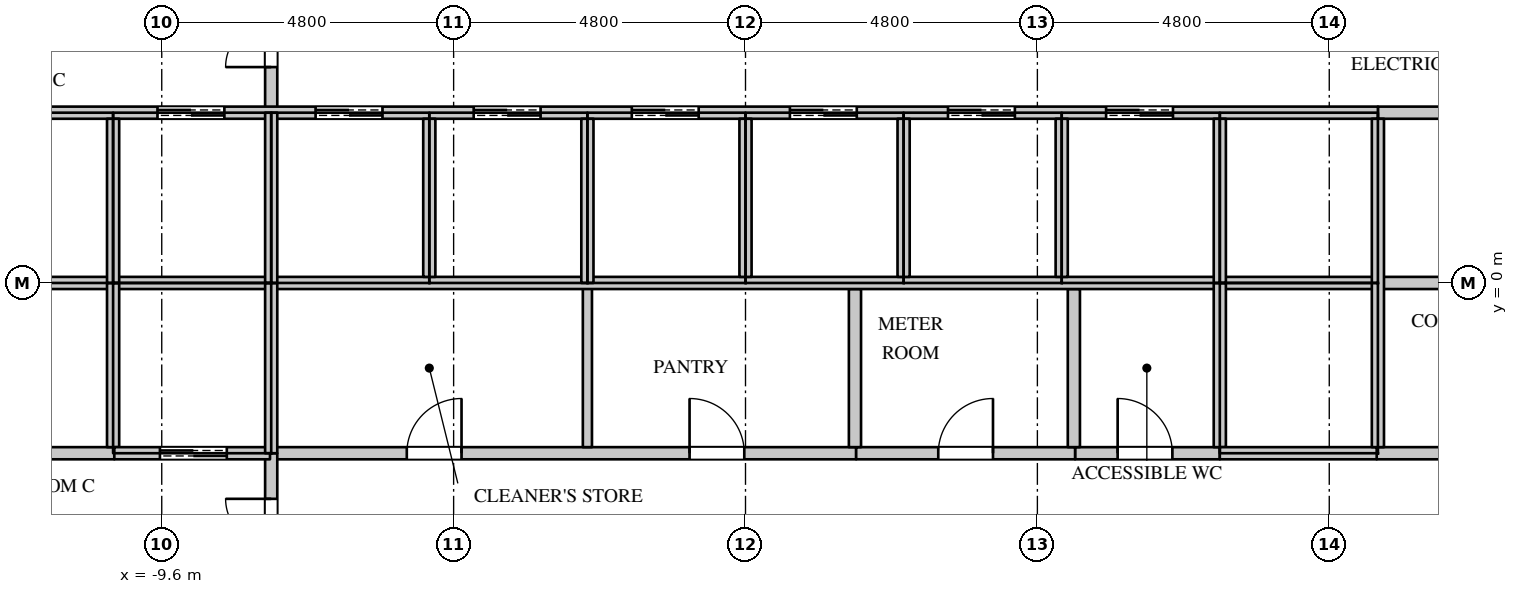
"""IFC4 building model, lengths in metres.
Left out: names, types, materials, properties, quantities, classifications, styles, units other than length and angle.
Written with IfcOpenShell. Run it as: python <this file> out.ifc"""

import sys

from ifc_helpers import new_model, si_unit, direction, frame, frame_2d, origin, place, context, subcontext, project, spatial, rectangle, extrude, element, fill, save


model = new_model("IFC4")
c1 = context("Model", 3, precision=1e-05, world=origin(), true_north=direction((0.0, 1.0)))
c2 = subcontext(c1, "Body", "Model", "MODEL_VIEW")
j1 = project(units=[si_unit("LENGTHUNIT", "METRE"), si_unit("PLANEANGLEUNIT", "RADIAN")], contexts=[c1])
p1 = place(None, origin())
s1 = spatial("IfcSite", under=j1, at=p1, CompositionType="ELEMENT")
p2 = place(p1, origin())
s2 = spatial("IfcBuilding", under=s1, at=p2, CompositionType="ELEMENT")
p3 = place(p2, frame((0.0, 0.0, 144.3)))
s3 = spatial("IfcBuildingStorey", under=s2, at=p3, CompositionType="ELEMENT", Elevation=144.3)
p4 = place(p3, frame((-7.82, -2.8, 0.0), z_axis=(0.0, 0.0, 1.0), x_axis=(1.0, 0.0, 0.0)))
e1 = element("IfcWall", 1, at=p4, inside=s3, PredefinedType="PARTITIONING", context=c2, shape_type="SweptSolid", body=[
    extrude(rectangle(XDim=9.64, YDim=0.2, at=frame_2d((4.82, 0.0))), origin(), (0.0, 0.0, 1.0), 3.798),
])
p5 = place(p4, frame((2.25, 0.0, 0.0)))
e2 = element("IfcOpeningElement", 2, at=p5, cuts=e1, PredefinedType="OPENING", context=c2, shape_type="SweptSolid", body=[
    extrude(rectangle(XDim=0.9, YDim=2.2, at=frame_2d((0.45, 1.1))), frame((0.0, 0.11, 0.0), z_axis=(0.0, -1.0, 0.0), x_axis=(1.0, 0.0, 0.0)), (0.0, 0.0, 1.0), 0.22),
])
p6 = place(p4, frame((6.9, 0.0, 0.0)))
e3 = element("IfcOpeningElement", 3, at=p6, cuts=e1, PredefinedType="OPENING", context=c2, shape_type="SweptSolid", body=[
    extrude(rectangle(XDim=0.9, YDim=2.2, at=frame_2d((0.45, 1.1))), frame((0.0, 0.11, 0.0), z_axis=(0.0, -1.0, 0.0), x_axis=(1.0, 0.0, 0.0)), (0.0, 0.0, 1.0), 0.22),
])
p7 = place(p3, frame((-7.8, -5.8, 0.0), z_axis=(0.0, 0.0, 1.0), x_axis=(0.0, 1.0, 0.0)))
e4 = element("IfcWall", 4, at=p7, inside=s3, PredefinedType="PARTITIONING", context=c2, shape_type="SweptSolid", body=[
    extrude(rectangle(XDim=3.0, YDim=0.2, at=frame_2d((1.5, 0.0))), origin(), (0.0, 0.0, 1.0), 3.798),
])
p8 = place(p7, frame((0.75, 0.0, 0.0)))
e5 = element("IfcOpeningElement", 5, at=p8, cuts=e4, PredefinedType="OPENING", context=c2, shape_type="SweptSolid", body=[
    extrude(rectangle(XDim=1.5, YDim=2.4, at=frame_2d((0.75, 1.2))), frame((0.0, 0.11, 0.0), z_axis=(0.0, -1.0, 0.0), x_axis=(1.0, 0.0, 0.0)), (0.0, 0.0, 1.0), 0.22),
])
p9 = place(p3, frame((-7.8, 2.8, 0.0), z_axis=(0.0, 0.0, 1.0), x_axis=(0.0, 1.0, 0.0)))
e6 = element("IfcWall", 6, at=p9, inside=s3, PredefinedType="PARTITIONING", context=c2, shape_type="SweptSolid", body=[
    extrude(rectangle(XDim=3.0, YDim=0.2, at=frame_2d((1.5, 0.0))), origin(), (0.0, 0.0, 1.0), 3.798),
])
p10 = place(p9, frame((0.75, 0.0, 0.0)))
e7 = element("IfcOpeningElement", 7, at=p10, cuts=e6, PredefinedType="OPENING", context=c2, shape_type="SweptSolid", body=[
    extrude(rectangle(XDim=1.5, YDim=2.4, at=frame_2d((0.75, 1.2))), frame((0.0, 0.11, 0.0), z_axis=(0.0, -1.0, 0.0), x_axis=(1.0, 0.0, 0.0)), (0.0, 0.0, 1.0), 0.22),
])
p11 = place(p3, frame((5.42, -2.8, 0.0), z_axis=(0.0, 0.0, 1.0), x_axis=(1.0, 0.0, 0.0)))
e8 = element("IfcWall", 8, at=p11, inside=s3, PredefinedType="PARTITIONING", context=c2, shape_type="SweptSolid", body=[
    extrude(rectangle(XDim=2.38, YDim=0.2, at=frame_2d((1.19, 0.0))), origin(), (0.0, 0.0, 1.0), 3.798),
])
p12 = place(p11, frame((0.7, 0.0, 0.0)))
e9 = element("IfcOpeningElement", 9, at=p12, cuts=e8, PredefinedType="OPENING", context=c2, shape_type="SweptSolid", body=[
    extrude(rectangle(XDim=0.9, YDim=2.2, at=frame_2d((0.45, 1.1))), frame((0.0, 0.11, 0.0), z_axis=(0.0, -1.0, 0.0), x_axis=(1.0, 0.0, 0.0)), (0.0, 0.0, 1.0), 0.22),
])
p13 = place(p3, frame((-2.6, -2.7, 0.0), z_axis=(0.0, 0.0, 1.0), x_axis=(0.0, 1.0, 0.0)))
e10 = element("IfcWall", 10, at=p13, inside=s3, PredefinedType="PARTITIONING", context=c2, shape_type="SweptSolid", body=[
    extrude(rectangle(XDim=2.7, YDim=0.15, at=frame_2d((1.35, 0.0))), origin(), (0.0, 0.0, 1.0), 3.798),
])
p14 = place(p3, frame((-13.57, -2.8, 0.0), z_axis=(0.0, 0.0, 1.0), x_axis=(1.0, 0.0, 0.0)))
e11 = element("IfcWall", 11, at=p14, inside=s3, PredefinedType="PARTITIONING", context=c2, shape_type="SweptSolid", body=[
    extrude(rectangle(XDim=3.19, YDim=0.2, at=frame_2d((1.595, 0.0))), origin(), (0.0, 0.0, 1.0), 3.798),
])
p15 = place(p14, frame((1.25, 0.0, 0.0)))
e12 = element("IfcOpeningElement", 12, at=p15, cuts=e11, PredefinedType="OPENING", context=c2, shape_type="SweptSolid", body=[
    extrude(rectangle(XDim=0.6, YDim=2.0, at=frame_2d((0.3, 1.0))), frame((0.0, 0.11, 0.0), z_axis=(0.0, -1.0, 0.0), x_axis=(1.0, 0.0, 0.0)), (0.0, 0.0, 1.0), 0.22),
])
p16 = place(p3, frame((1.82, -2.8, 0.0), z_axis=(0.0, 0.0, 1.0), x_axis=(1.0, 0.0, 0.0)))
e13 = element("IfcWall", 13, at=p16, inside=s3, PredefinedType="PARTITIONING", context=c2, shape_type="SweptSolid", body=[
    extrude(rectangle(XDim=3.6, YDim=0.2, at=frame_2d((1.8, 0.0))), origin(), (0.0, 0.0, 1.0), 3.798),
])
p17 = place(p16, frame((1.35, 0.0, 0.0)))
e14 = element("IfcOpeningElement", 14, at=p17, cuts=e13, PredefinedType="OPENING", context=c2, shape_type="SweptSolid", body=[
    extrude(rectangle(XDim=0.9, YDim=2.2, at=frame_2d((0.45, 1.1))), frame((0.0, 0.11, 0.0), z_axis=(0.0, -1.0, 0.0), x_axis=(1.0, 0.0, 0.0)), (0.0, 0.0, 1.0), 0.22),
])
for number, where, z_axis, x_axis in (
    (15, (1.8, -2.7, 0.0), (0.0, 0.0, 1.0), (0.0, 1.0, 0.0)),
    (16, (5.4, -2.7, 0.0), (0.0, 0.0, 1.0), (0.0, 1.0, 0.0)),
):
    element("IfcWall", number, at=place(p3, frame(where, z_axis=z_axis, x_axis=x_axis)), inside=s3, PredefinedType="PARTITIONING", context=c2, shape_type="SweptSolid", body=[
        extrude(rectangle(XDim=2.6, YDim=0.2, at=frame_2d((1.3, 0.0))), origin(), (0.0, 0.0, 1.0), 3.798),
    ])
p18 = place(p3, frame((10.38, -2.8, 0.0), z_axis=(0.0, 0.0, 1.0), x_axis=(1.0, 0.0, 0.0)))
e17 = element("IfcWall", 17, at=p18, inside=s3, PredefinedType="PARTITIONING", context=c2, shape_type="SweptSolid", body=[
    extrude(rectangle(XDim=3.19, YDim=0.2, at=frame_2d((1.595, 0.0))), origin(), (0.0, 0.0, 1.0), 3.798),
])
p19 = place(p18, frame((1.1, 0.0, 0.0)))
e18 = element("IfcOpeningElement", 18, at=p19, cuts=e17, PredefinedType="OPENING", context=c2, shape_type="SweptSolid", body=[
    extrude(rectangle(XDim=0.9, YDim=2.2, at=frame_2d((0.45, 1.1))), frame((0.0, 0.11, 0.0), z_axis=(0.0, -1.0, 0.0), x_axis=(1.0, 0.0, 0.0)), (0.0, 0.0, 1.0), 0.22),
])
p20 = place(p3, frame((10.4, 2.8, 0.0), z_axis=(0.0, 0.0, 1.0), x_axis=(1.0, 0.0, 0.0)))
e19 = element("IfcWall", 19, at=p20, inside=s3, PredefinedType="PARTITIONING", context=c2, shape_type="SweptSolid", body=[
    extrude(rectangle(XDim=3.17, YDim=0.2, at=frame_2d((1.585, 0.0))), origin(), (0.0, 0.0, 1.0), 3.798),
])
p21 = place(p20, frame((1.25, 0.0, 0.0)))
e20 = element("IfcOpeningElement", 20, at=p21, cuts=e19, PredefinedType="OPENING", context=c2, shape_type="SweptSolid", body=[
    extrude(rectangle(XDim=0.6, YDim=2.0, at=frame_2d((0.3, 1.0))), frame((0.0, 0.11, 0.0), z_axis=(0.0, -1.0, 0.0), x_axis=(1.0, 0.0, 0.0)), (0.0, 0.0, 1.0), 0.22),
])
p22 = place(p3, frame((10.4, 0.0, 0.0), z_axis=(0.0, 0.0, 1.0), x_axis=(1.0, 0.0, 0.0)))
e21 = element("IfcWall", 21, at=p22, inside=s3, PredefinedType="PARTITIONING", context=c2, shape_type="SweptSolid", body=[
    extrude(rectangle(XDim=3.17, YDim=0.2, at=frame_2d((1.585, 0.0))), origin(), (0.0, 0.0, 1.0), 3.798),
])
p23 = place(p3, frame((-13.57, 0.0, 0.0), z_axis=(0.0, 0.0, 1.0), x_axis=(1.0, 0.0, 0.0)))
e22 = element("IfcWall", 22, at=p23, inside=s3, PredefinedType="PARTITIONING", context=c2, shape_type="SweptSolid", body=[
    extrude(rectangle(XDim=23.97, YDim=0.2, at=frame_2d((11.985, 0.0))), origin(), (0.0, 0.0, 1.0), 3.798),
])
p24 = place(p3, frame((-13.57, 2.8, 0.0), z_axis=(0.0, 0.0, 1.0), x_axis=(1.0, 0.0, 0.0)))
e23 = element("IfcWall", 23, at=p24, inside=s3, PredefinedType="PARTITIONING", context=c2, shape_type="SweptSolid", body=[
    extrude(rectangle(XDim=23.97, YDim=0.2, at=frame_2d((11.985, 0.0))), origin(), (0.0, 0.0, 1.0), 3.798),
])
p25 = place(p24, frame((1.0, 0.0, 0.0)))
e24 = element("IfcOpeningElement", 24, at=p25, cuts=e23, PredefinedType="OPENING", context=c2, shape_type="SweptSolid", body=[
    extrude(rectangle(XDim=1.1, YDim=2.2, at=frame_2d((0.55, 1.1))), frame((0.0, 0.11, 0.0), z_axis=(0.0, -1.0, 0.0), x_axis=(1.0, 0.0, 0.0)), (0.0, 0.0, 1.0), 0.22),
])
p26 = place(p24, frame((3.9, 0.0, 0.0)))
e25 = element("IfcOpeningElement", 25, at=p26, cuts=e23, PredefinedType="OPENING", context=c2, shape_type="SweptSolid", body=[
    extrude(rectangle(XDim=1.1, YDim=2.2, at=frame_2d((0.55, 1.1))), frame((0.0, 0.11, 0.0), z_axis=(0.0, -1.0, 0.0), x_axis=(1.0, 0.0, 0.0)), (0.0, 0.0, 1.0), 0.22),
])
p27 = place(p24, frame((6.5, 0.0, 0.0)))
e26 = element("IfcOpeningElement", 26, at=p27, cuts=e23, PredefinedType="OPENING", context=c2, shape_type="SweptSolid", body=[
    extrude(rectangle(XDim=1.1, YDim=2.2, at=frame_2d((0.55, 1.1))), frame((0.0, 0.11, 0.0), z_axis=(0.0, -1.0, 0.0), x_axis=(1.0, 0.0, 0.0)), (0.0, 0.0, 1.0), 0.22),
])
p28 = place(p24, frame((9.1, 0.0, 0.0)))
e27 = element("IfcOpeningElement", 27, at=p28, cuts=e23, PredefinedType="OPENING", context=c2, shape_type="SweptSolid", body=[
    extrude(rectangle(XDim=1.1, YDim=2.2, at=frame_2d((0.55, 1.1))), frame((0.0, 0.11, 0.0), z_axis=(0.0, -1.0, 0.0), x_axis=(1.0, 0.0, 0.0)), (0.0, 0.0, 1.0), 0.22),
])
p29 = place(p24, frame((11.7, 0.0, 0.0)))
e28 = element("IfcOpeningElement", 28, at=p29, cuts=e23, PredefinedType="OPENING", context=c2, shape_type="SweptSolid", body=[
    extrude(rectangle(XDim=1.1, YDim=2.2, at=frame_2d((0.55, 1.1))), frame((0.0, 0.11, 0.0), z_axis=(0.0, -1.0, 0.0), x_axis=(1.0, 0.0, 0.0)), (0.0, 0.0, 1.0), 0.22),
])
p30 = place(p24, frame((14.3, 0.0, 0.0)))
e29 = element("IfcOpeningElement", 29, at=p30, cuts=e23, PredefinedType="OPENING", context=c2, shape_type="SweptSolid", body=[
    extrude(rectangle(XDim=1.1, YDim=2.2, at=frame_2d((0.55, 1.1))), frame((0.0, 0.11, 0.0), z_axis=(0.0, -1.0, 0.0), x_axis=(1.0, 0.0, 0.0)), (0.0, 0.0, 1.0), 0.22),
])
p31 = place(p24, frame((16.9, 0.0, 0.0)))
e30 = element("IfcOpeningElement", 30, at=p31, cuts=e23, PredefinedType="OPENING", context=c2, shape_type="SweptSolid", body=[
    extrude(rectangle(XDim=1.1, YDim=2.2, at=frame_2d((0.55, 1.1))), frame((0.0, 0.11, 0.0), z_axis=(0.0, -1.0, 0.0), x_axis=(1.0, 0.0, 0.0)), (0.0, 0.0, 1.0), 0.22),
])
p32 = place(p24, frame((19.5, 0.0, 0.0)))
e31 = element("IfcOpeningElement", 31, at=p32, cuts=e23, PredefinedType="OPENING", context=c2, shape_type="SweptSolid", body=[
    extrude(rectangle(XDim=1.1, YDim=2.2, at=frame_2d((0.55, 1.1))), frame((0.0, 0.11, 0.0), z_axis=(0.0, -1.0, 0.0), x_axis=(1.0, 0.0, 0.0)), (0.0, 0.0, 1.0), 0.22),
])
p33 = place(p3, frame((-10.4, -2.7, 0.0), z_axis=(0.0, 0.0, 1.0), x_axis=(0.0, 1.0, 0.0)))
e32 = element("IfcWall", 32, at=p33, inside=s3, PredefinedType="PARTITIONING", context=c2, shape_type="SweptSolid", body=[
    extrude(rectangle(XDim=2.7, YDim=0.2, at=frame_2d((1.35, 0.0))), origin(), (0.0, 0.0, 1.0), 3.798),
])
p34 = place(p3, frame((-10.38, -2.8, 0.0), z_axis=(0.0, 0.0, 1.0), x_axis=(1.0, 0.0, 0.0)))
e33 = element("IfcWall", 33, at=p34, inside=s3, PredefinedType="PARTITIONING", context=c2, shape_type="SweptSolid", body=[
    extrude(rectangle(XDim=2.56, YDim=0.2, at=frame_2d((1.28, 0.0))), origin(), (0.0, 0.0, 1.0), 3.798),
])
p35 = place(p34, frame((0.75, 0.0, 0.0)))
e34 = element("IfcOpeningElement", 34, at=p35, cuts=e33, PredefinedType="OPENING", context=c2, shape_type="SweptSolid", body=[
    extrude(rectangle(XDim=1.1, YDim=2.2, at=frame_2d((0.55, 1.1))), frame((0.0, 0.11, 0.0), z_axis=(0.0, -1.0, 0.0), x_axis=(1.0, 0.0, 0.0)), (0.0, 0.0, 1.0), 0.22),
])
p36 = place(p3, frame((-10.4, 0.0, 0.0), z_axis=(0.0, 0.0, 1.0), x_axis=(0.0, 1.0, 0.0)))
e35 = element("IfcWall", 35, at=p36, inside=s3, PredefinedType="PARTITIONING", context=c2, shape_type="SweptSolid", body=[
    extrude(rectangle(XDim=2.7, YDim=0.2, at=frame_2d((1.35, 0.0))), origin(), (0.0, 0.0, 1.0), 3.798),
])
for number, where, z_axis, x_axis in (
    (36, (-7.8, -2.8, 0.0), (0.0, 0.0, 1.0), (0.0, 1.0, 0.0)),
    (37, (-7.8, 0.0, 0.0), (0.0, 0.0, 1.0), (0.0, 1.0, 0.0)),
):
    element("IfcWall", number, at=place(p3, frame(where, z_axis=z_axis, x_axis=x_axis)), inside=s3, PredefinedType="PARTITIONING", context=c2, shape_type="SweptSolid", body=[
        extrude(rectangle(XDim=2.8, YDim=0.2, at=frame_2d((1.4, 0.0))), origin(), (0.0, 0.0, 1.0), 3.798),
    ])
p37 = place(p3, frame((-5.2, 0.1, 0.0), z_axis=(0.0, 0.0, 1.0), x_axis=(0.0, 1.0, 0.0)))
e38 = element("IfcWall", 38, at=p37, inside=s3, PredefinedType="PARTITIONING", context=c2, shape_type="SweptSolid", body=[
    extrude(rectangle(XDim=2.6, YDim=0.2, at=frame_2d((1.3, 0.0))), origin(), (0.0, 0.0, 1.0), 3.798),
])
p38 = place(p3, frame((-2.6, 0.0, 0.0), z_axis=(0.0, 0.0, 1.0), x_axis=(0.0, 1.0, 0.0)))
e39 = element("IfcWall", 39, at=p38, inside=s3, PredefinedType="PARTITIONING", context=c2, shape_type="SweptSolid", body=[
    extrude(rectangle(XDim=2.7, YDim=0.2, at=frame_2d((1.35, 0.0))), origin(), (0.0, 0.0, 1.0), 3.798),
])
for number, where, z_axis, x_axis in (
    (40, (0.0, 0.1, 0.0), (0.0, 0.0, 1.0), (0.0, 1.0, 0.0)),
    (41, (2.6, 0.1, 0.0), (0.0, 0.0, 1.0), (0.0, 1.0, 0.0)),
    (42, (5.2, 0.1, 0.0), (0.0, 0.0, 1.0), (0.0, 1.0, 0.0)),
):
    element("IfcWall", number, at=place(p3, frame(where, z_axis=z_axis, x_axis=x_axis)), inside=s3, PredefinedType="PARTITIONING", context=c2, shape_type="SweptSolid", body=[
        extrude(rectangle(XDim=2.6, YDim=0.2, at=frame_2d((1.3, 0.0))), origin(), (0.0, 0.0, 1.0), 3.798),
    ])
p39 = place(p3, frame((7.8, -2.7, 0.0), z_axis=(0.0, 0.0, 1.0), x_axis=(0.0, 1.0, 0.0)))
e43 = element("IfcWall", 43, at=p39, inside=s3, PredefinedType="PARTITIONING", context=c2, shape_type="SweptSolid", body=[
    extrude(rectangle(XDim=2.7, YDim=0.2, at=frame_2d((1.35, 0.0))), origin(), (0.0, 0.0, 1.0), 3.798),
])
p40 = place(p3, frame((7.8, -2.8, 0.0), z_axis=(0.0, 0.0, 1.0), x_axis=(1.0, 0.0, 0.0)))
e44 = element("IfcWall", 44, at=p40, inside=s3, PredefinedType="PARTITIONING", context=c2, shape_type="SweptSolid", body=[
    extrude(rectangle(XDim=2.58, YDim=0.2, at=frame_2d((1.29, 0.0))), origin(), (0.0, 0.0, 1.0), 3.798),
])
p41 = place(p3, frame((7.8, 0.0, 0.0), z_axis=(0.0, 0.0, 1.0), x_axis=(0.0, 1.0, 0.0)))
e45 = element("IfcWall", 45, at=p41, inside=s3, PredefinedType="PARTITIONING", context=c2, shape_type="SweptSolid", body=[
    extrude(rectangle(XDim=2.7, YDim=0.2, at=frame_2d((1.35, 0.0))), origin(), (0.0, 0.0, 1.0), 3.798),
])
p42 = place(p3, frame((10.4, -2.7, 0.0), z_axis=(0.0, 0.0, 1.0), x_axis=(0.0, 1.0, 0.0)))
e46 = element("IfcWall", 46, at=p42, inside=s3, PredefinedType="PARTITIONING", context=c2, shape_type="SweptSolid", body=[
    extrude(rectangle(XDim=5.4, YDim=0.2, at=frame_2d((2.7, 0.0))), origin(), (0.0, 0.0, 1.0), 3.798),
])
p43 = place(p5, origin())
e47 = element("IfcDoor", 47, at=p43, inside=s3, OperationType="SINGLE_SWING_RIGHT", PredefinedType="DOOR", context=c2, shape_type="SweptSolid", body=[
    extrude(rectangle(XDim=0.9, YDim=2.2, at=frame_2d((0.45, 1.1))), frame((0.0, 0.025, 0.0), z_axis=(0.0, -1.0, 0.0), x_axis=(1.0, 0.0, 0.0)), (0.0, 0.0, 1.0), 0.05),
])
fill(e2, e47)
p44 = place(p6, origin())
e48 = element("IfcDoor", 48, at=p44, inside=s3, OperationType="SINGLE_SWING_LEFT", PredefinedType="DOOR", context=c2, shape_type="SweptSolid", body=[
    extrude(rectangle(XDim=0.9, YDim=2.2, at=frame_2d((0.45, 1.1))), frame((0.0, 0.025, 0.0), z_axis=(0.0, -1.0, 0.0), x_axis=(1.0, 0.0, 0.0)), (0.0, 0.0, 1.0), 0.05),
])
fill(e3, e48)
p45 = place(p17, origin())
e49 = element("IfcDoor", 49, at=p45, inside=s3, OperationType="SINGLE_SWING_RIGHT", PredefinedType="DOOR", context=c2, shape_type="SweptSolid", body=[
    extrude(rectangle(XDim=0.9, YDim=2.2, at=frame_2d((0.45, 1.1))), frame((0.0, 0.025, 0.0), z_axis=(0.0, -1.0, 0.0), x_axis=(1.0, 0.0, 0.0)), (0.0, 0.0, 1.0), 0.05),
])
fill(e14, e49)
p46 = place(p12, origin())
e50 = element("IfcDoor", 50, at=p46, inside=s3, OperationType="SINGLE_SWING_LEFT", PredefinedType="DOOR", context=c2, shape_type="SweptSolid", body=[
    extrude(rectangle(XDim=0.9, YDim=2.2, at=frame_2d((0.45, 1.1))), frame((0.0, 0.025, 0.0), z_axis=(0.0, -1.0, 0.0), x_axis=(1.0, 0.0, 0.0)), (0.0, 0.0, 1.0), 0.05),
])
fill(e9, e50)
p47 = place(p26, origin())
e51 = element("IfcDoor", 51, at=p47, inside=s3, OperationType="DOUBLE_DOOR_SLIDING", PredefinedType="DOOR", context=c2, shape_type="SweptSolid", body=[
    extrude(rectangle(XDim=1.1, YDim=2.2, at=frame_2d((0.55, 1.1))), frame((0.0, 0.025, 0.0), z_axis=(0.0, -1.0, 0.0), x_axis=(1.0, 0.0, 0.0)), (0.0, 0.0, 1.0), 0.05),
])
fill(e25, e51)
p48 = place(p35, origin())
e52 = element("IfcDoor", 52, at=p48, inside=s3, OperationType="DOUBLE_DOOR_SLIDING", PredefinedType="DOOR", context=c2, shape_type="SweptSolid", body=[
    extrude(rectangle(XDim=1.1, YDim=2.2, at=frame_2d((0.55, 1.1))), frame((0.0, 0.025, 0.0), z_axis=(0.0, -1.0, 0.0), x_axis=(1.0, 0.0, 0.0)), (0.0, 0.0, 1.0), 0.05),
])
fill(e34, e52)
p49 = place(p27, origin())
e53 = element("IfcDoor", 53, at=p49, inside=s3, OperationType="DOUBLE_DOOR_SLIDING", PredefinedType="DOOR", context=c2, shape_type="SweptSolid", body=[
    extrude(rectangle(XDim=1.1, YDim=2.2, at=frame_2d((0.55, 1.1))), frame((0.0, 0.025, 0.0), z_axis=(0.0, -1.0, 0.0), x_axis=(1.0, 0.0, 0.0)), (0.0, 0.0, 1.0), 0.05),
])
fill(e26, e53)
p50 = place(p28, origin())
e54 = element("IfcDoor", 54, at=p50, inside=s3, OperationType="DOUBLE_DOOR_SLIDING", PredefinedType="DOOR", context=c2, shape_type="SweptSolid", body=[
    extrude(rectangle(XDim=1.1, YDim=2.2, at=frame_2d((0.55, 1.1))), frame((0.0, 0.025, 0.0), z_axis=(0.0, -1.0, 0.0), x_axis=(1.0, 0.0, 0.0)), (0.0, 0.0, 1.0), 0.05),
])
fill(e27, e54)
p51 = place(p29, origin())
e55 = element("IfcDoor", 55, at=p51, inside=s3, OperationType="DOUBLE_DOOR_SLIDING", PredefinedType="DOOR", context=c2, shape_type="SweptSolid", body=[
    extrude(rectangle(XDim=1.1, YDim=2.2, at=frame_2d((0.55, 1.1))), frame((0.0, 0.025, 0.0), z_axis=(0.0, -1.0, 0.0), x_axis=(1.0, 0.0, 0.0)), (0.0, 0.0, 1.0), 0.05),
])
fill(e28, e55)
p52 = place(p30, origin())
e56 = element("IfcDoor", 56, at=p52, inside=s3, OperationType="DOUBLE_DOOR_SLIDING", PredefinedType="DOOR", context=c2, shape_type="SweptSolid", body=[
    extrude(rectangle(XDim=1.1, YDim=2.2, at=frame_2d((0.55, 1.1))), frame((0.0, 0.025, 0.0), z_axis=(0.0, -1.0, 0.0), x_axis=(1.0, 0.0, 0.0)), (0.0, 0.0, 1.0), 0.05),
])
fill(e29, e56)
p53 = place(p31, origin())
e57 = element("IfcDoor", 57, at=p53, inside=s3, OperationType="DOUBLE_DOOR_SLIDING", PredefinedType="DOOR", context=c2, shape_type="SweptSolid", body=[
    extrude(rectangle(XDim=1.1, YDim=2.2, at=frame_2d((0.55, 1.1))), frame((0.0, 0.025, 0.0), z_axis=(0.0, -1.0, 0.0), x_axis=(1.0, 0.0, 0.0)), (0.0, 0.0, 1.0), 0.05),
])
fill(e30, e57)
p54 = place(p32, origin())
e58 = element("IfcDoor", 58, at=p54, inside=s3, OperationType="DOUBLE_DOOR_SLIDING", PredefinedType="DOOR", context=c2, shape_type="SweptSolid", body=[
    extrude(rectangle(XDim=1.1, YDim=2.2, at=frame_2d((0.55, 1.1))), frame((0.0, 0.025, 0.0), z_axis=(0.0, -1.0, 0.0), x_axis=(1.0, 0.0, 0.0)), (0.0, 0.0, 1.0), 0.05),
])
fill(e31, e58)
p55 = place(p10, origin())
e59 = element("IfcDoor", 59, at=p55, inside=s3, OperationType="DOUBLE_DOOR_SINGLE_SWING", PredefinedType="DOOR", context=c2, shape_type="SweptSolid", body=[
    extrude(rectangle(XDim=1.5, YDim=2.4, at=frame_2d((0.75, 1.2))), frame((0.0, 0.025, 0.0), z_axis=(0.0, -1.0, 0.0), x_axis=(1.0, 0.0, 0.0)), (0.0, 0.0, 1.0), 0.05),
])
fill(e7, e59)
p56 = place(p8, origin())
e60 = element("IfcDoor", 60, at=p56, inside=s3, OperationType="DOUBLE_DOOR_SINGLE_SWING", PredefinedType="DOOR", context=c2, shape_type="SweptSolid", body=[
    extrude(rectangle(XDim=1.5, YDim=2.4, at=frame_2d((0.75, 1.2))), frame((0.0, 0.025, 0.0), z_axis=(0.0, -1.0, 0.0), x_axis=(1.0, 0.0, 0.0)), (0.0, 0.0, 1.0), 0.05),
])
fill(e5, e60)
save(model, sys.argv[1])
